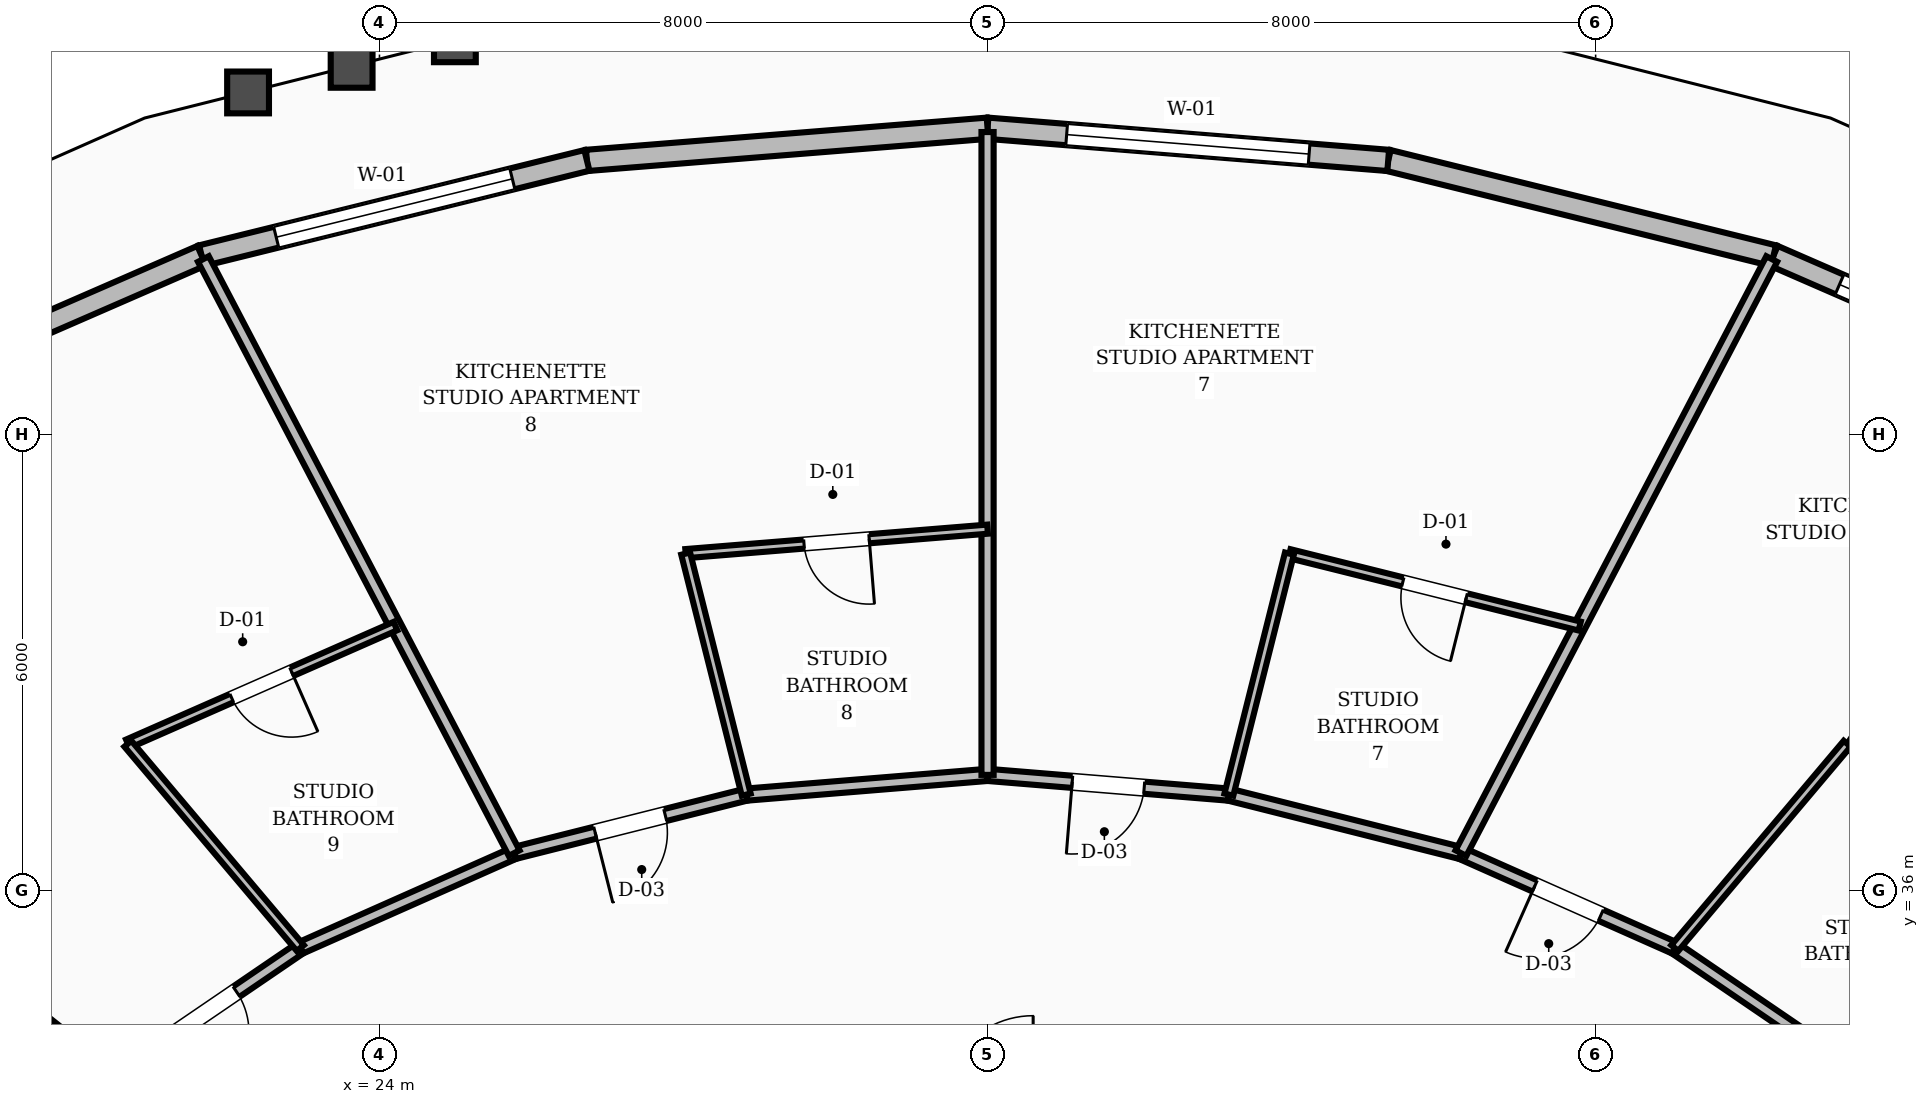
"""IFC4 building model, lengths in metres.
Left out: names, types, materials, properties, quantities, classifications, styles, units other than length and angle.
Written with IfcOpenShell. Run it as: python <this file> out.ifc"""

import sys

from ifc_helpers import new_model, si_unit, direction, frame, frame_2d, origin, place, context, subcontext, project, spatial, rectangle, extrude, element, fill, save


model = new_model("IFC4")
c1 = context("Model", 3, precision=1e-05, world=origin(), true_north=direction((0.0, 1.0)))
c2 = subcontext(c1, "Body", "Model", "MODEL_VIEW")
j1 = project(units=[si_unit("LENGTHUNIT", "METRE"), si_unit("PLANEANGLEUNIT", "RADIAN")], contexts=[c1])
p1 = place(None, origin())
s1 = spatial("IfcSite", under=j1, at=p1, CompositionType="ELEMENT")
p2 = place(p1, origin())
s2 = spatial("IfcBuilding", under=s1, at=p2, CompositionType="ELEMENT")
p3 = place(p2, frame((0.0, 0.0, 84.4)))
s3 = spatial("IfcBuildingStorey", under=s2, at=p3, CompositionType="ELEMENT", Elevation=84.4)
p4 = place(p3, frame((47.011, 42.313, 0.0), z_axis=(0.0, 0.0, 1.0), x_axis=(-0.916774249717, 0.399405777445, 0.0)))
e1 = element("IfcWall", 1, at=p4, inside=s3, PredefinedType="STANDARD", context=c2, shape_type="SweptSolid", body=[
    extrude(rectangle(XDim=5.095, YDim=0.28, at=frame_2d((2.548, 0.0))), origin(), (0.0, 0.0, 1.0), 2.71),
])
p5 = place(p4, frame((0.948, 0.0, 0.8)))
e2 = element("IfcOpeningElement", 2, at=p5, cuts=e1, PredefinedType="OPENING", context=c2, shape_type="SweptSolid", body=[
    extrude(rectangle(XDim=3.2, YDim=1.65, at=frame_2d((1.6, 0.825))), frame((0.0, 0.15, 0.0), z_axis=(0.0, -1.0, 0.0), x_axis=(1.0, 0.0, 0.0)), (0.0, 0.0, 1.0), 0.3),
])
p6 = place(p3, frame((42.34, 44.349, 0.0), z_axis=(0.0, 0.0, 1.0), x_axis=(-0.970758207565, 0.240059372749, 0.0)))
e3 = element("IfcWall", 3, at=p6, inside=s3, PredefinedType="STANDARD", context=c2, shape_type="SweptSolid", body=[
    extrude(rectangle(XDim=5.221, YDim=0.28, at=frame_2d((2.611, 0.0))), origin(), (0.0, 0.0, 1.0), 2.71),
])
p7 = place(p3, frame((37.271, 45.602, 0.0), z_axis=(0.0, 0.0, 1.0), x_axis=(-0.996790273468, 0.08005717157, 0.0)))
e4 = element("IfcWall", 4, at=p7, inside=s3, PredefinedType="STANDARD", context=c2, shape_type="SweptSolid", body=[
    extrude(rectangle(XDim=5.288, YDim=0.28, at=frame_2d((2.644, 0.0))), origin(), (0.0, 0.0, 1.0), 2.71),
])
p8 = place(p7, frame((1.044, 0.0, 0.8)))
e5 = element("IfcOpeningElement", 5, at=p8, cuts=e4, PredefinedType="OPENING", context=c2, shape_type="SweptSolid", body=[
    extrude(rectangle(XDim=3.2, YDim=1.65, at=frame_2d((1.6, 0.825))), frame((0.0, 0.15, 0.0), z_axis=(0.0, -1.0, 0.0), x_axis=(1.0, 0.0, 0.0)), (0.0, 0.0, 1.0), 0.3),
])
p9 = place(p3, frame((32.0, 46.025, 0.0), z_axis=(0.0, 0.0, 1.0), x_axis=(-0.996790273468, -0.08005717157, 0.0)))
e6 = element("IfcWall", 6, at=p9, inside=s3, PredefinedType="STANDARD", context=c2, shape_type="SweptSolid", body=[
    extrude(rectangle(XDim=5.288, YDim=0.28, at=frame_2d((2.644, 0.0))), origin(), (0.0, 0.0, 1.0), 2.71),
])
p10 = place(p3, frame((26.729, 45.602, 0.0), z_axis=(0.0, 0.0, 1.0), x_axis=(-0.970758207565, -0.240059372749, 0.0)))
e7 = element("IfcWall", 7, at=p10, inside=s3, PredefinedType="STANDARD", context=c2, shape_type="SweptSolid", body=[
    extrude(rectangle(XDim=5.221, YDim=0.28, at=frame_2d((2.611, 0.0))), origin(), (0.0, 0.0, 1.0), 2.71),
])
p11 = place(p10, frame((1.01, 0.0, 0.8)))
e8 = element("IfcOpeningElement", 8, at=p11, cuts=e7, PredefinedType="OPENING", context=c2, shape_type="SweptSolid", body=[
    extrude(rectangle(XDim=3.2, YDim=1.65, at=frame_2d((1.6, 0.825))), frame((0.0, 0.15, 0.0), z_axis=(0.0, -1.0, 0.0), x_axis=(1.0, 0.0, 0.0)), (0.0, 0.0, 1.0), 0.3),
])
p12 = place(p3, frame((21.66, 44.349, 0.0), z_axis=(0.0, 0.0, 1.0), x_axis=(-0.916774249717, -0.399405777445, 0.0)))
e9 = element("IfcWall", 9, at=p12, inside=s3, PredefinedType="STANDARD", context=c2, shape_type="SweptSolid", body=[
    extrude(rectangle(XDim=5.095, YDim=0.28, at=frame_2d((2.548, 0.0))), origin(), (0.0, 0.0, 1.0), 2.71),
])
p13 = place(p3, frame((43.508, 33.559, 0.0), z_axis=(0.0, 0.0, 1.0), x_axis=(-0.826293096206, 0.56324037423, 0.0)))
e10 = element("IfcWall", 10, at=p13, inside=s3, PredefinedType="SOLIDWALL", context=c2, shape_type="SweptSolid", body=[
    extrude(rectangle(XDim=2.985, YDim=0.16, at=frame_2d((1.492, 0.0))), origin(), (0.0, 0.0, 1.0), 2.71),
])
p14 = place(p3, frame((41.041, 35.24, 0.0), z_axis=(0.0, 0.0, 1.0), x_axis=(-0.913952123493, 0.405822024984, 0.0)))
e11 = element("IfcWall", 11, at=p14, inside=s3, PredefinedType="SOLIDWALL", context=c2, shape_type="SweptSolid", body=[
    extrude(rectangle(XDim=3.078, YDim=0.16, at=frame_2d((1.539, 0.0))), origin(), (0.0, 0.0, 1.0), 2.71),
])
p15 = place(p14, frame((1.064, 0.0, 0.0)))
e12 = element("IfcOpeningElement", 12, at=p15, cuts=e11, PredefinedType="OPENING", context=c2, shape_type="SweptSolid", body=[
    extrude(rectangle(XDim=0.95, YDim=2.1, at=frame_2d((0.475, 1.05))), frame((0.0, 0.09, 0.0), z_axis=(0.0, -1.0, 0.0), x_axis=(1.0, 0.0, 0.0)), (0.0, 0.0, 1.0), 0.18),
])
p16 = place(p3, frame((38.228, 36.489, 0.0), z_axis=(0.0, 0.0, 1.0), x_axis=(-0.969689238064, 0.244341526521, 0.0)))
e13 = element("IfcWall", 13, at=p16, inside=s3, PredefinedType="SOLIDWALL", context=c2, shape_type="SweptSolid", body=[
    extrude(rectangle(XDim=3.148, YDim=0.16, at=frame_2d((1.574, 0.0))), origin(), (0.0, 0.0, 1.0), 2.71),
])
p17 = place(p3, frame((35.175, 37.258, 0.0), z_axis=(0.0, 0.0, 1.0), x_axis=(-0.996669377538, 0.081548463373, 0.0)))
e14 = element("IfcWall", 14, at=p17, inside=s3, PredefinedType="SOLIDWALL", context=c2, shape_type="SweptSolid", body=[
    extrude(rectangle(XDim=3.185, YDim=0.16, at=frame_2d((1.593, 0.0))), origin(), (0.0, 0.0, 1.0), 2.71),
])
p18 = place(p17, frame((1.118, 0.0, 0.0)))
e15 = element("IfcOpeningElement", 15, at=p18, cuts=e14, PredefinedType="OPENING", context=c2, shape_type="SweptSolid", body=[
    extrude(rectangle(XDim=0.95, YDim=2.1, at=frame_2d((0.475, 1.05))), frame((0.0, 0.09, 0.0), z_axis=(0.0, -1.0, 0.0), x_axis=(1.0, 0.0, 0.0)), (0.0, 0.0, 1.0), 0.18),
])
p19 = place(p3, frame((32.0, 37.518, 0.0), z_axis=(0.0, 0.0, 1.0), x_axis=(-0.996669377538, -0.081548463373, 0.0)))
e16 = element("IfcWall", 16, at=p19, inside=s3, PredefinedType="SOLIDWALL", context=c2, shape_type="SweptSolid", body=[
    extrude(rectangle(XDim=3.185, YDim=0.16, at=frame_2d((1.593, 0.0))), origin(), (0.0, 0.0, 1.0), 2.71),
])
p20 = place(p3, frame((28.825, 37.258, 0.0), z_axis=(0.0, 0.0, 1.0), x_axis=(-0.969689238064, -0.244341526521, 0.0)))
e17 = element("IfcWall", 17, at=p20, inside=s3, PredefinedType="SOLIDWALL", context=c2, shape_type="SweptSolid", body=[
    extrude(rectangle(XDim=3.148, YDim=0.16, at=frame_2d((1.574, 0.0))), origin(), (0.0, 0.0, 1.0), 2.71),
])
p21 = place(p20, frame((1.099, 0.0, 0.0)))
e18 = element("IfcOpeningElement", 18, at=p21, cuts=e17, PredefinedType="OPENING", context=c2, shape_type="SweptSolid", body=[
    extrude(rectangle(XDim=0.95, YDim=2.1, at=frame_2d((0.475, 1.05))), frame((0.0, 0.09, 0.0), z_axis=(0.0, -1.0, 0.0), x_axis=(1.0, 0.0, 0.0)), (0.0, 0.0, 1.0), 0.18),
])
p22 = place(p3, frame((25.772, 36.489, 0.0), z_axis=(0.0, 0.0, 1.0), x_axis=(-0.913952123493, -0.405822024984, 0.0)))
e19 = element("IfcWall", 19, at=p22, inside=s3, PredefinedType="SOLIDWALL", context=c2, shape_type="SweptSolid", body=[
    extrude(rectangle(XDim=3.078, YDim=0.16, at=frame_2d((1.539, 0.0))), origin(), (0.0, 0.0, 1.0), 2.71),
])
p23 = place(p3, frame((22.959, 35.24, 0.0), z_axis=(0.0, 0.0, 1.0), x_axis=(-0.826293096206, -0.56324037423, 0.0)))
e20 = element("IfcWall", 20, at=p23, inside=s3, PredefinedType="SOLIDWALL", context=c2, shape_type="SweptSolid", body=[
    extrude(rectangle(XDim=2.985, YDim=0.16, at=frame_2d((1.492, 0.0))), origin(), (0.0, 0.0, 1.0), 2.71),
])
p24 = place(p23, frame((1.017, 0.0, 0.0)))
e21 = element("IfcOpeningElement", 21, at=p24, cuts=e20, PredefinedType="OPENING", context=c2, shape_type="SweptSolid", body=[
    extrude(rectangle(XDim=0.95, YDim=2.1, at=frame_2d((0.475, 1.05))), frame((0.0, 0.09, 0.0), z_axis=(0.0, -1.0, 0.0), x_axis=(1.0, 0.0, 0.0)), (0.0, 0.0, 1.0), 0.18),
])
p25 = place(p3, frame((46.395, 35.844, 0.0), z_axis=(0.0, 0.0, 1.0), x_axis=(-0.82873612878, 0.559639552618, 0.0)))
e22 = element("IfcWall", 22, at=p25, inside=s3, PredefinedType="PARTITIONING", context=c2, shape_type="SweptSolid", body=[
    extrude(rectangle(XDim=3.722, YDim=0.12, at=frame_2d((1.861, 0.0))), origin(), (0.0, 0.0, 1.0), 2.71),
])
p26 = place(p25, frame((1.431, 0.0, 0.0)))
e23 = element("IfcOpeningElement", 23, at=p26, cuts=e22, PredefinedType="OPENING", context=c2, shape_type="SweptSolid", body=[
    extrude(rectangle(XDim=0.86, YDim=2.1, at=frame_2d((0.43, 1.05))), frame((0.0, 0.07, 0.0), z_axis=(0.0, -1.0, 0.0), x_axis=(1.0, 0.0, 0.0)), (0.0, 0.0, 1.0), 0.14),
])
p27 = place(p3, frame((41.041, 35.24, 0.0), z_axis=(0.0, 0.0, 1.0), x_axis=(0.644964696284, 0.764212366131, 0.0)))
e24 = element("IfcWall", 24, at=p27, inside=s3, PredefinedType="PARTITIONING", context=c2, shape_type="SweptSolid", body=[
    extrude(rectangle(XDim=3.517, YDim=0.12, at=frame_2d((1.759, 0.0))), origin(), (0.0, 0.0, 1.0), 2.71),
])
p28 = place(p3, frame((38.228, 36.489, 0.0), z_axis=(0.0, 0.0, 1.0), x_axis=(0.463546676058, 0.886072502178, 0.0)))
e25 = element("IfcWall", 25, at=p28, inside=s3, PredefinedType="SOLIDWALL", context=c2, shape_type="SweptSolid", body=[
    extrude(rectangle(XDim=8.82, YDim=0.16, at=frame_2d((4.41, 0.0))), origin(), (0.0, 0.0, 1.0), 2.71),
])
p29 = place(p3, frame((39.79, 39.476, 0.0), z_axis=(0.0, 0.0, 1.0), x_axis=(-0.970222716949, 0.242214532009, 0.0)))
e26 = element("IfcWall", 26, at=p29, inside=s3, PredefinedType="PARTITIONING", context=c2, shape_type="SweptSolid", body=[
    extrude(rectangle(XDim=3.936, YDim=0.12, at=frame_2d((1.968, 0.0))), origin(), (0.0, 0.0, 1.0), 2.71),
])
p30 = place(p29, frame((1.538, 0.0, 0.0)))
e27 = element("IfcOpeningElement", 27, at=p30, cuts=e26, PredefinedType="OPENING", context=c2, shape_type="SweptSolid", body=[
    extrude(rectangle(XDim=0.86, YDim=2.1, at=frame_2d((0.43, 1.05))), frame((0.0, 0.07, 0.0), z_axis=(0.0, -1.0, 0.0), x_axis=(1.0, 0.0, 0.0)), (0.0, 0.0, 1.0), 0.14),
])
p31 = place(p3, frame((35.175, 37.258, 0.0), z_axis=(0.0, 0.0, 1.0), x_axis=(0.243677606505, 0.969856290431, 0.0)))
e28 = element("IfcWall", 28, at=p31, inside=s3, PredefinedType="PARTITIONING", context=c2, shape_type="SweptSolid", body=[
    extrude(rectangle(XDim=3.269, YDim=0.12, at=frame_2d((1.635, 0.0))), origin(), (0.0, 0.0, 1.0), 2.71),
])
p32 = place(p3, frame((32.0, 37.518, 0.0), z_axis=(0.0, 0.0, 1.0), x_axis=(0.0, 1.0, 0.0)))
e29 = element("IfcWall", 29, at=p32, inside=s3, PredefinedType="SOLIDWALL", context=c2, shape_type="SweptSolid", body=[
    extrude(rectangle(XDim=8.457, YDim=0.16, at=frame_2d((4.229, 0.0))), origin(), (0.0, 0.0, 1.0), 2.71),
])
p33 = place(p3, frame((32.0, 40.751, 0.0), z_axis=(0.0, 0.0, 1.0), x_axis=(-0.996733715321, -0.080758285904, 0.0)))
e30 = element("IfcWall", 30, at=p33, inside=s3, PredefinedType="PARTITIONING", context=c2, shape_type="SweptSolid", body=[
    extrude(rectangle(XDim=3.984, YDim=0.12, at=frame_2d((1.992, 0.0))), origin(), (0.0, 0.0, 1.0), 2.71),
])
p34 = place(p33, frame((1.562, 0.0, 0.0)))
e31 = element("IfcOpeningElement", 31, at=p34, cuts=e30, PredefinedType="OPENING", context=c2, shape_type="SweptSolid", body=[
    extrude(rectangle(XDim=0.86, YDim=2.1, at=frame_2d((0.43, 1.05))), frame((0.0, 0.07, 0.0), z_axis=(0.0, -1.0, 0.0), x_axis=(1.0, 0.0, 0.0)), (0.0, 0.0, 1.0), 0.14),
])
p35 = place(p3, frame((28.825, 37.258, 0.0), z_axis=(0.0, 0.0, 1.0), x_axis=(-0.243677606505, 0.969856290431, 0.0)))
e32 = element("IfcWall", 32, at=p35, inside=s3, PredefinedType="PARTITIONING", context=c2, shape_type="SweptSolid", body=[
    extrude(rectangle(XDim=3.269, YDim=0.12, at=frame_2d((1.635, 0.0))), origin(), (0.0, 0.0, 1.0), 2.71),
])
p36 = place(p3, frame((25.772, 36.489, 0.0), z_axis=(0.0, 0.0, 1.0), x_axis=(-0.463546676058, 0.886072502178, 0.0)))
e33 = element("IfcWall", 33, at=p36, inside=s3, PredefinedType="SOLIDWALL", context=c2, shape_type="SweptSolid", body=[
    extrude(rectangle(XDim=8.82, YDim=0.16, at=frame_2d((4.41, 0.0))), origin(), (0.0, 0.0, 1.0), 2.71),
])
p37 = place(p3, frame((24.21, 39.476, 0.0), z_axis=(0.0, 0.0, 1.0), x_axis=(-0.915386176675, -0.402576884026, 0.0)))
e34 = element("IfcWall", 34, at=p37, inside=s3, PredefinedType="PARTITIONING", context=c2, shape_type="SweptSolid", body=[
    extrude(rectangle(XDim=3.845, YDim=0.12, at=frame_2d((1.922, 0.0))), origin(), (0.0, 0.0, 1.0), 2.71),
])
p38 = place(p37, frame((1.492, 0.0, 0.0)))
e35 = element("IfcOpeningElement", 35, at=p38, cuts=e34, PredefinedType="OPENING", context=c2, shape_type="SweptSolid", body=[
    extrude(rectangle(XDim=0.86, YDim=2.1, at=frame_2d((0.43, 1.05))), frame((0.0, 0.07, 0.0), z_axis=(0.0, -1.0, 0.0), x_axis=(1.0, 0.0, 0.0)), (0.0, 0.0, 1.0), 0.14),
])
p39 = place(p3, frame((22.959, 35.24, 0.0), z_axis=(0.0, 0.0, 1.0), x_axis=(-0.644964696284, 0.764212366131, 0.0)))
e36 = element("IfcWall", 36, at=p39, inside=s3, PredefinedType="PARTITIONING", context=c2, shape_type="SweptSolid", body=[
    extrude(rectangle(XDim=3.517, YDim=0.12, at=frame_2d((1.759, 0.0))), origin(), (0.0, 0.0, 1.0), 2.71),
])
p40 = place(p3, frame((20.492, 33.559, 0.0), z_axis=(0.0, 0.0, 1.0), x_axis=(-0.784008851618, 0.620749644047, 0.0)))
e37 = element("IfcWall", 37, at=p40, inside=s3, PredefinedType="SOLIDWALL", context=c2, shape_type="SweptSolid", body=[
    extrude(rectangle(XDim=9.641, YDim=0.16, at=frame_2d((4.82, 0.0))), origin(), (0.0, 0.0, 1.0), 2.71),
])
p41 = place(p5, origin())
e38 = element("IfcWindow", 38, at=p41, inside=s3, PartitioningType="SINGLE_PANEL", PredefinedType="WINDOW", context=c2, shape_type="SweptSolid", body=[
    extrude(rectangle(XDim=3.2, YDim=1.65, at=frame_2d((1.6, 0.825))), frame((0.0, 0.03, 0.0), z_axis=(0.0, -1.0, 0.0), x_axis=(1.0, 0.0, 0.0)), (0.0, 0.0, 1.0), 0.06),
])
fill(e2, e38)
p42 = place(p8, origin())
e39 = element("IfcWindow", 39, at=p42, inside=s3, PartitioningType="SINGLE_PANEL", PredefinedType="WINDOW", context=c2, shape_type="SweptSolid", body=[
    extrude(rectangle(XDim=3.2, YDim=1.65, at=frame_2d((1.6, 0.825))), frame((0.0, 0.03, 0.0), z_axis=(0.0, -1.0, 0.0), x_axis=(1.0, 0.0, 0.0)), (0.0, 0.0, 1.0), 0.06),
])
fill(e5, e39)
p43 = place(p11, origin())
e40 = element("IfcWindow", 40, at=p43, inside=s3, PartitioningType="SINGLE_PANEL", PredefinedType="WINDOW", context=c2, shape_type="SweptSolid", body=[
    extrude(rectangle(XDim=3.2, YDim=1.65, at=frame_2d((1.6, 0.825))), frame((0.0, 0.03, 0.0), z_axis=(0.0, -1.0, 0.0), x_axis=(1.0, 0.0, 0.0)), (0.0, 0.0, 1.0), 0.06),
])
fill(e8, e40)
p44 = place(p15, origin())
e41 = element("IfcDoor", 41, at=p44, inside=s3, OperationType="SINGLE_SWING_RIGHT", PredefinedType="DOOR", context=c2, shape_type="SweptSolid", body=[
    extrude(rectangle(XDim=0.95, YDim=2.1, at=frame_2d((0.475, 1.05))), frame((0.0, 0.025, 0.0), z_axis=(0.0, -1.0, 0.0), x_axis=(1.0, 0.0, 0.0)), (0.0, 0.0, 1.0), 0.05),
])
fill(e12, e41)
p45 = place(p30, origin())
e42 = element("IfcDoor", 42, at=p45, inside=s3, OperationType="SINGLE_SWING_LEFT", PredefinedType="DOOR", context=c2, shape_type="SweptSolid", body=[
    extrude(rectangle(XDim=0.86, YDim=2.1, at=frame_2d((0.43, 1.05))), frame((0.0, 0.025, 0.0), z_axis=(0.0, -1.0, 0.0), x_axis=(1.0, 0.0, 0.0)), (0.0, 0.0, 1.0), 0.05),
])
fill(e27, e42)
p46 = place(p18, origin())
e43 = element("IfcDoor", 43, at=p46, inside=s3, OperationType="SINGLE_SWING_RIGHT", PredefinedType="DOOR", context=c2, shape_type="SweptSolid", body=[
    extrude(rectangle(XDim=0.95, YDim=2.1, at=frame_2d((0.475, 1.05))), frame((0.0, 0.025, 0.0), z_axis=(0.0, -1.0, 0.0), x_axis=(1.0, 0.0, 0.0)), (0.0, 0.0, 1.0), 0.05),
])
fill(e15, e43)
p47 = place(p34, origin())
e44 = element("IfcDoor", 44, at=p47, inside=s3, OperationType="SINGLE_SWING_LEFT", PredefinedType="DOOR", context=c2, shape_type="SweptSolid", body=[
    extrude(rectangle(XDim=0.86, YDim=2.1, at=frame_2d((0.43, 1.05))), frame((0.0, 0.025, 0.0), z_axis=(0.0, -1.0, 0.0), x_axis=(1.0, 0.0, 0.0)), (0.0, 0.0, 1.0), 0.05),
])
fill(e31, e44)
p48 = place(p21, origin())
e45 = element("IfcDoor", 45, at=p48, inside=s3, OperationType="SINGLE_SWING_RIGHT", PredefinedType="DOOR", context=c2, shape_type="SweptSolid", body=[
    extrude(rectangle(XDim=0.95, YDim=2.1, at=frame_2d((0.475, 1.05))), frame((0.0, 0.025, 0.0), z_axis=(0.0, -1.0, 0.0), x_axis=(1.0, 0.0, 0.0)), (0.0, 0.0, 1.0), 0.05),
])
fill(e18, e45)
p49 = place(p38, origin())
e46 = element("IfcDoor", 46, at=p49, inside=s3, OperationType="SINGLE_SWING_LEFT", PredefinedType="DOOR", context=c2, shape_type="SweptSolid", body=[
    extrude(rectangle(XDim=0.86, YDim=2.1, at=frame_2d((0.43, 1.05))), frame((0.0, 0.025, 0.0), z_axis=(0.0, -1.0, 0.0), x_axis=(1.0, 0.0, 0.0)), (0.0, 0.0, 1.0), 0.05),
])
fill(e35, e46)
p50 = place(p24, origin())
e47 = element("IfcDoor", 47, at=p50, inside=s3, OperationType="SINGLE_SWING_RIGHT", PredefinedType="DOOR", context=c2, shape_type="SweptSolid", body=[
    extrude(rectangle(XDim=0.95, YDim=2.1, at=frame_2d((0.475, 1.05))), frame((0.0, 0.025, 0.0), z_axis=(0.0, -1.0, 0.0), x_axis=(1.0, 0.0, 0.0)), (0.0, 0.0, 1.0), 0.05),
])
fill(e21, e47)
save(model, sys.argv[1])
